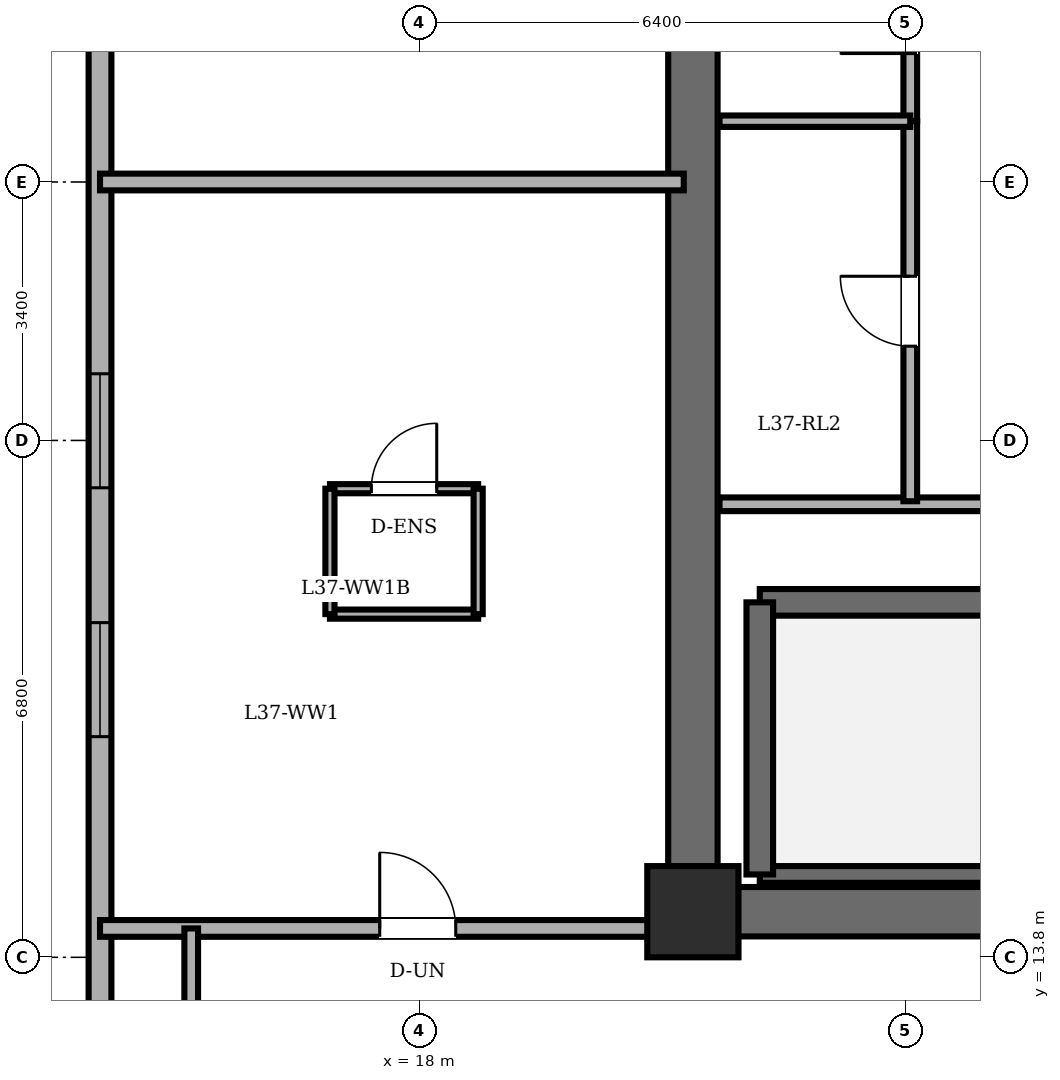
"""IFC4 building model, lengths in metres.
Left out: names, types, materials, properties, quantities, classifications, styles, units other than length and angle.
Written with IfcOpenShell. Run it as: python <this file> out.ifc"""

import sys

from ifc_helpers import new_model, si_unit, direction, frame, frame_2d, origin, origin_2d, place, context, subcontext, project, spatial, rectangle, extrude, element, fill, save


model = new_model("IFC4")
c1 = context("Model", 3, precision=1e-05, world=origin(), true_north=direction((0.0, 1.0)))
c2 = subcontext(c1, "Body", "Model", "MODEL_VIEW")
j1 = project(units=[si_unit("LENGTHUNIT", "METRE"), si_unit("PLANEANGLEUNIT", "RADIAN")], contexts=[c1])
p1 = place(None, origin())
s1 = spatial("IfcSite", under=j1, at=p1, CompositionType="ELEMENT")
p2 = place(p1, origin())
s2 = spatial("IfcBuilding", under=s1, at=p2, CompositionType="ELEMENT")
p3 = place(p2, frame((0.0, 0.0, 143.8)))
s3 = spatial("IfcBuildingStorey", under=s2, at=p3, CompositionType="ELEMENT", Elevation=143.8)
p4 = place(p3, frame((21.6, 14.4, 0.0), z_axis=(0.0, 0.0, 1.0), x_axis=(1.0, 0.0, 0.0)))
e1 = element("IfcColumn", 1, at=p4, inside=s3, PredefinedType="COLUMN", context=c2, shape_type="SweptSolid", body=[
    extrude(rectangle(XDim=1.2, YDim=1.2, at=origin_2d()), origin(), (0.0, 0.0, 1.0), 3.6),
])
p5 = place(p3, frame((13.8, 36.3, 0.0), z_axis=(0.0, 0.0, 1.0), x_axis=(0.0, -1.0, 0.0)))
e2 = element("IfcWall", 2, at=p5, inside=s3, PredefinedType="SOLIDWALL", context=c2, shape_type="SweptSolid", body=[
    extrude(rectangle(XDim=24.6, YDim=0.3, at=frame_2d((12.3, 0.0))), origin(), (0.0, 0.0, 1.0), 3.4),
])
p6 = place(p5, frame((5.003, 0.0, 0.85)))
e3 = element("IfcOpeningElement", 3, at=p6, cuts=e2, PredefinedType="OPENING", context=c2, shape_type="SweptSolid", body=[
    extrude(rectangle(XDim=1.5, YDim=1.55, at=frame_2d((0.75, 0.775))), frame((0.0, 0.16, 0.0), z_axis=(0.0, -1.0, 0.0), x_axis=(1.0, 0.0, 0.0)), (0.0, 0.0, 1.0), 0.32),
])
p7 = place(p5, frame((8.277, 0.0, 0.85)))
e4 = element("IfcOpeningElement", 4, at=p7, cuts=e2, PredefinedType="OPENING", context=c2, shape_type="SweptSolid", body=[
    extrude(rectangle(XDim=1.5, YDim=1.55, at=frame_2d((0.75, 0.775))), frame((0.0, 0.16, 0.0), z_axis=(0.0, -1.0, 0.0), x_axis=(1.0, 0.0, 0.0)), (0.0, 0.0, 1.0), 0.32),
])
p8 = place(p5, frame((14.823, 0.0, 0.85)))
e5 = element("IfcOpeningElement", 5, at=p8, cuts=e2, PredefinedType="OPENING", context=c2, shape_type="SweptSolid", body=[
    extrude(rectangle(XDim=1.5, YDim=1.55, at=frame_2d((0.75, 0.775))), frame((0.0, 0.16, 0.0), z_axis=(0.0, -1.0, 0.0), x_axis=(1.0, 0.0, 0.0)), (0.0, 0.0, 1.0), 0.32),
])
p9 = place(p5, frame((18.097, 0.0, 0.85)))
e6 = element("IfcOpeningElement", 6, at=p9, cuts=e2, PredefinedType="OPENING", context=c2, shape_type="SweptSolid", body=[
    extrude(rectangle(XDim=1.5, YDim=1.55, at=frame_2d((0.75, 0.775))), frame((0.0, 0.16, 0.0), z_axis=(0.0, -1.0, 0.0), x_axis=(1.0, 0.0, 0.0)), (0.0, 0.0, 1.0), 0.32),
])
p10 = place(p3, frame((21.6, 14.4, 0.0), z_axis=(0.0, 0.0, 1.0), x_axis=(0.0, 1.0, 0.0)))
e7 = element("IfcWall", 7, at=p10, inside=s3, PredefinedType="SHEAR", context=c2, shape_type="SweptSolid", body=[
    extrude(rectangle(XDim=19.2, YDim=0.65, at=frame_2d((9.6, 0.0))), origin(), (0.0, 0.0, 1.0), 3.4),
])
p11 = place(p3, frame((37.2, 14.4, 0.0), z_axis=(0.0, 0.0, 1.0), x_axis=(-1.0, 0.0, 0.0)))
e8 = element("IfcWall", 8, at=p11, inside=s3, PredefinedType="SHEAR", context=c2, shape_type="SweptSolid", body=[
    extrude(rectangle(XDim=15.6, YDim=0.65, at=frame_2d((7.8, 0.0))), origin(), (0.0, 0.0, 1.0), 3.4),
])
p12 = place(p3, frame((22.48, 18.47, 0.0), z_axis=(0.0, 0.0, 1.0), x_axis=(1.0, 0.0, 0.0)))
e9 = element("IfcWall", 9, at=p12, inside=s3, PredefinedType="SOLIDWALL", context=c2, shape_type="SweptSolid", body=[
    extrude(rectangle(XDim=7.79, YDim=0.35, at=frame_2d((3.895, 0.0))), origin(), (0.0, 0.0, 1.0), 3.4),
])
p13 = place(p3, frame((22.48, 14.89, 0.0), z_axis=(0.0, 0.0, 1.0), x_axis=(1.0, 0.0, 0.0)))
e10 = element("IfcWall", 10, at=p13, inside=s3, PredefinedType="PARTITIONING", context=c2, shape_type="SweptSolid", body=[
    extrude(rectangle(XDim=7.79, YDim=0.22, at=frame_2d((3.895, 0.0))), origin(), (0.0, 0.0, 1.0), 3.4),
])
p14 = place(p3, frame((22.48, 14.89, 0.0), z_axis=(0.0, 0.0, 1.0), x_axis=(0.0, 1.0, 0.0)))
e11 = element("IfcWall", 11, at=p14, inside=s3, PredefinedType="SOLIDWALL", context=c2, shape_type="SweptSolid", body=[
    extrude(rectangle(XDim=3.58, YDim=0.35, at=frame_2d((1.79, 0.0))), origin(), (0.0, 0.0, 1.0), 3.4),
])
p15 = place(p3, frame((21.95, 19.76, 0.0), z_axis=(0.0, 0.0, 1.0), x_axis=(1.0, 0.0, 0.0)))
e12 = element("IfcWall", 12, at=p15, inside=s3, PredefinedType="PARTITIONING", context=c2, shape_type="SweptSolid", body=[
    extrude(rectangle(XDim=14.87, YDim=0.18, at=frame_2d((7.435, 0.0))), origin(), (0.0, 0.0, 1.0), 3.4),
])
p16 = place(p3, frame((24.46, 24.8, 0.0), z_axis=(0.0, 0.0, 1.0), x_axis=(0.0, 1.0, 0.0)))
e13 = element("IfcWall", 13, at=p16, inside=s3, PredefinedType="PARTITIONING", context=c2, shape_type="SweptSolid", body=[
    extrude(rectangle(XDim=2.7, YDim=0.18, at=frame_2d((1.35, 0.0))), origin(), (0.0, 0.0, 1.0), 3.4),
])
p17 = place(p16, frame((0.89, 0.0, 0.0)))
e14 = element("IfcOpeningElement", 14, at=p17, cuts=e13, PredefinedType="OPENING", context=c2, shape_type="SweptSolid", body=[
    extrude(rectangle(XDim=0.92, YDim=2.1, at=frame_2d((0.46, 1.05))), frame((0.0, 0.1, 0.0), z_axis=(0.0, -1.0, 0.0), x_axis=(1.0, 0.0, 0.0)), (0.0, 0.0, 1.0), 0.2),
])
p18 = place(p3, frame((24.46, 19.8, 0.0), z_axis=(0.0, 0.0, 1.0), x_axis=(0.0, 1.0, 0.0)))
e15 = element("IfcWall", 15, at=p18, inside=s3, PredefinedType="PARTITIONING", context=c2, shape_type="SweptSolid", body=[
    extrude(rectangle(XDim=5.0, YDim=0.18, at=frame_2d((2.5, 0.0))), origin(), (0.0, 0.0, 1.0), 3.4),
])
p19 = place(p18, frame((2.04, 0.0, 0.0)))
e16 = element("IfcOpeningElement", 16, at=p19, cuts=e15, PredefinedType="OPENING", context=c2, shape_type="SweptSolid", body=[
    extrude(rectangle(XDim=0.92, YDim=2.1, at=frame_2d((0.46, 1.05))), frame((0.0, 0.1, 0.0), z_axis=(0.0, -1.0, 0.0), x_axis=(1.0, 0.0, 0.0)), (0.0, 0.0, 1.0), 0.2),
])
p20 = place(p3, frame((21.95, 24.8, 0.0), z_axis=(0.0, 0.0, 1.0), x_axis=(1.0, 0.0, 0.0)))
e17 = element("IfcWall", 17, at=p20, inside=s3, PredefinedType="PARTITIONING", context=c2, shape_type="SweptSolid", body=[
    extrude(rectangle(XDim=2.51, YDim=0.15, at=frame_2d((1.255, 0.0))), origin(), (0.0, 0.0, 1.0), 3.4),
])
p21 = place(p3, frame((16.825, 19.965, 0.0), z_axis=(0.0, 0.0, 1.0), x_axis=(1.0, 0.0, 0.0)))
e18 = element("IfcWall", 18, at=p21, inside=s3, PredefinedType="PARTITIONING", context=c2, shape_type="SweptSolid", body=[
    extrude(rectangle(XDim=1.95, YDim=0.12, at=frame_2d((0.975, 0.0))), origin(), (0.0, 0.0, 1.0), 3.4),
])
p22 = place(p21, frame((0.545, 0.0, 0.0)))
e19 = element("IfcOpeningElement", 19, at=p22, cuts=e18, PredefinedType="OPENING", context=c2, shape_type="SweptSolid", body=[
    extrude(rectangle(XDim=0.86, YDim=2.1, at=frame_2d((0.43, 1.05))), frame((0.0, 0.07, 0.0), z_axis=(0.0, -1.0, 0.0), x_axis=(1.0, 0.0, 0.0)), (0.0, 0.0, 1.0), 0.14),
])
p23 = place(p3, frame((18.775, 18.315, 0.0), z_axis=(0.0, 0.0, 1.0), x_axis=(-1.0, 0.0, 0.0)))
e20 = element("IfcWall", 20, at=p23, inside=s3, PredefinedType="PARTITIONING", context=c2, shape_type="SweptSolid", body=[
    extrude(rectangle(XDim=1.95, YDim=0.12, at=frame_2d((0.975, 0.0))), origin(), (0.0, 0.0, 1.0), 3.4),
])
for number, where, z_axis, x_axis in (
    (21, (16.825, 19.965, 0.0), (0.0, 0.0, 1.0), (0.0, -1.0, 0.0)),
    (22, (18.775, 18.315, 0.0), (0.0, 0.0, 1.0), (0.0, 1.0, 0.0)),
):
    element("IfcWall", number, at=place(p3, frame(where, z_axis=z_axis, x_axis=x_axis)), inside=s3, PredefinedType="PARTITIONING", context=c2, shape_type="SweptSolid", body=[
        extrude(rectangle(XDim=1.65, YDim=0.12, at=frame_2d((0.825, 0.0))), origin(), (0.0, 0.0, 1.0), 3.4),
    ])
p24 = place(p3, frame((13.8, 14.18, 0.0), z_axis=(0.0, 0.0, 1.0), x_axis=(1.0, 0.0, 0.0)))
e23 = element("IfcWall", 23, at=p24, inside=s3, PredefinedType="PARTITIONING", context=c2, shape_type="SweptSolid", body=[
    extrude(rectangle(XDim=7.68, YDim=0.22, at=frame_2d((3.84, 0.0))), origin(), (0.0, 0.0, 1.0), 3.4),
])
p25 = place(p24, frame((3.68, 0.0, 0.0)))
e24 = element("IfcOpeningElement", 24, at=p25, cuts=e23, PredefinedType="OPENING", context=c2, shape_type="SweptSolid", body=[
    extrude(rectangle(XDim=1.0, YDim=2.15, at=frame_2d((0.5, 1.075))), frame((0.0, 0.12, 0.0), z_axis=(0.0, -1.0, 0.0), x_axis=(1.0, 0.0, 0.0)), (0.0, 0.0, 1.0), 0.24),
])
p26 = place(p3, frame((13.8, 24.0, 0.0), z_axis=(0.0, 0.0, 1.0), x_axis=(1.0, 0.0, 0.0)))
e25 = element("IfcWall", 25, at=p26, inside=s3, PredefinedType="PARTITIONING", context=c2, shape_type="SweptSolid", body=[
    extrude(rectangle(XDim=7.68, YDim=0.22, at=frame_2d((3.84, 0.0))), origin(), (0.0, 0.0, 1.0), 3.4),
])
p27 = place(p3, frame((15.0, 8.487, 0.0), z_axis=(0.0, 0.0, 1.0), x_axis=(0.0, 1.0, 0.0)))
e26 = element("IfcWall", 26, at=p27, inside=s3, PredefinedType="PARTITIONING", context=c2, shape_type="SweptSolid", body=[
    extrude(rectangle(XDim=5.693, YDim=0.18, at=frame_2d((2.846, 0.0))), origin(), (0.0, 0.0, 1.0), 3.4),
])
p28 = place(p8, origin())
e27 = element("IfcWindow", 27, at=p28, inside=s3, PartitioningType="DOUBLE_PANEL_VERTICAL", PredefinedType="WINDOW", context=c2, shape_type="SweptSolid", body=[
    extrude(rectangle(XDim=1.5, YDim=1.55, at=frame_2d((0.75, 0.775))), frame((0.0, 0.03, 0.0), z_axis=(0.0, -1.0, 0.0), x_axis=(1.0, 0.0, 0.0)), (0.0, 0.0, 1.0), 0.06),
])
fill(e5, e27)
p29 = place(p9, origin())
e28 = element("IfcWindow", 28, at=p29, inside=s3, PartitioningType="DOUBLE_PANEL_VERTICAL", PredefinedType="WINDOW", context=c2, shape_type="SweptSolid", body=[
    extrude(rectangle(XDim=1.5, YDim=1.55, at=frame_2d((0.75, 0.775))), frame((0.0, 0.03, 0.0), z_axis=(0.0, -1.0, 0.0), x_axis=(1.0, 0.0, 0.0)), (0.0, 0.0, 1.0), 0.06),
])
fill(e6, e28)
p30 = place(p17, origin())
e29 = element("IfcDoor", 29, at=p30, inside=s3, OperationType="SINGLE_SWING_LEFT", PredefinedType="DOOR", context=c2, shape_type="SweptSolid", body=[
    extrude(rectangle(XDim=0.92, YDim=2.1, at=frame_2d((0.46, 1.05))), frame((0.0, 0.025, 0.0), z_axis=(0.0, -1.0, 0.0), x_axis=(1.0, 0.0, 0.0)), (0.0, 0.0, 1.0), 0.05),
])
fill(e14, e29)
p31 = place(p19, origin())
e30 = element("IfcDoor", 30, at=p31, inside=s3, OperationType="SINGLE_SWING_RIGHT", PredefinedType="DOOR", context=c2, shape_type="SweptSolid", body=[
    extrude(rectangle(XDim=0.92, YDim=2.1, at=frame_2d((0.46, 1.05))), frame((0.0, 0.025, 0.0), z_axis=(0.0, -1.0, 0.0), x_axis=(1.0, 0.0, 0.0)), (0.0, 0.0, 1.0), 0.05),
])
fill(e16, e30)
p32 = place(p22, origin())
e31 = element("IfcDoor", 31, at=p32, inside=s3, OperationType="SINGLE_SWING_RIGHT", PredefinedType="DOOR", context=c2, shape_type="SweptSolid", body=[
    extrude(rectangle(XDim=0.86, YDim=2.1, at=frame_2d((0.43, 1.05))), frame((0.0, 0.025, 0.0), z_axis=(0.0, -1.0, 0.0), x_axis=(1.0, 0.0, 0.0)), (0.0, 0.0, 1.0), 0.05),
])
fill(e19, e31)
p33 = place(p25, origin())
e32 = element("IfcDoor", 32, at=p33, inside=s3, OperationType="SINGLE_SWING_LEFT", PredefinedType="DOOR", context=c2, shape_type="SweptSolid", body=[
    extrude(rectangle(XDim=1.0, YDim=2.15, at=frame_2d((0.5, 1.075))), frame((0.0, 0.025, 0.0), z_axis=(0.0, -1.0, 0.0), x_axis=(1.0, 0.0, 0.0)), (0.0, 0.0, 1.0), 0.05),
])
fill(e24, e32)
save(model, sys.argv[1])
